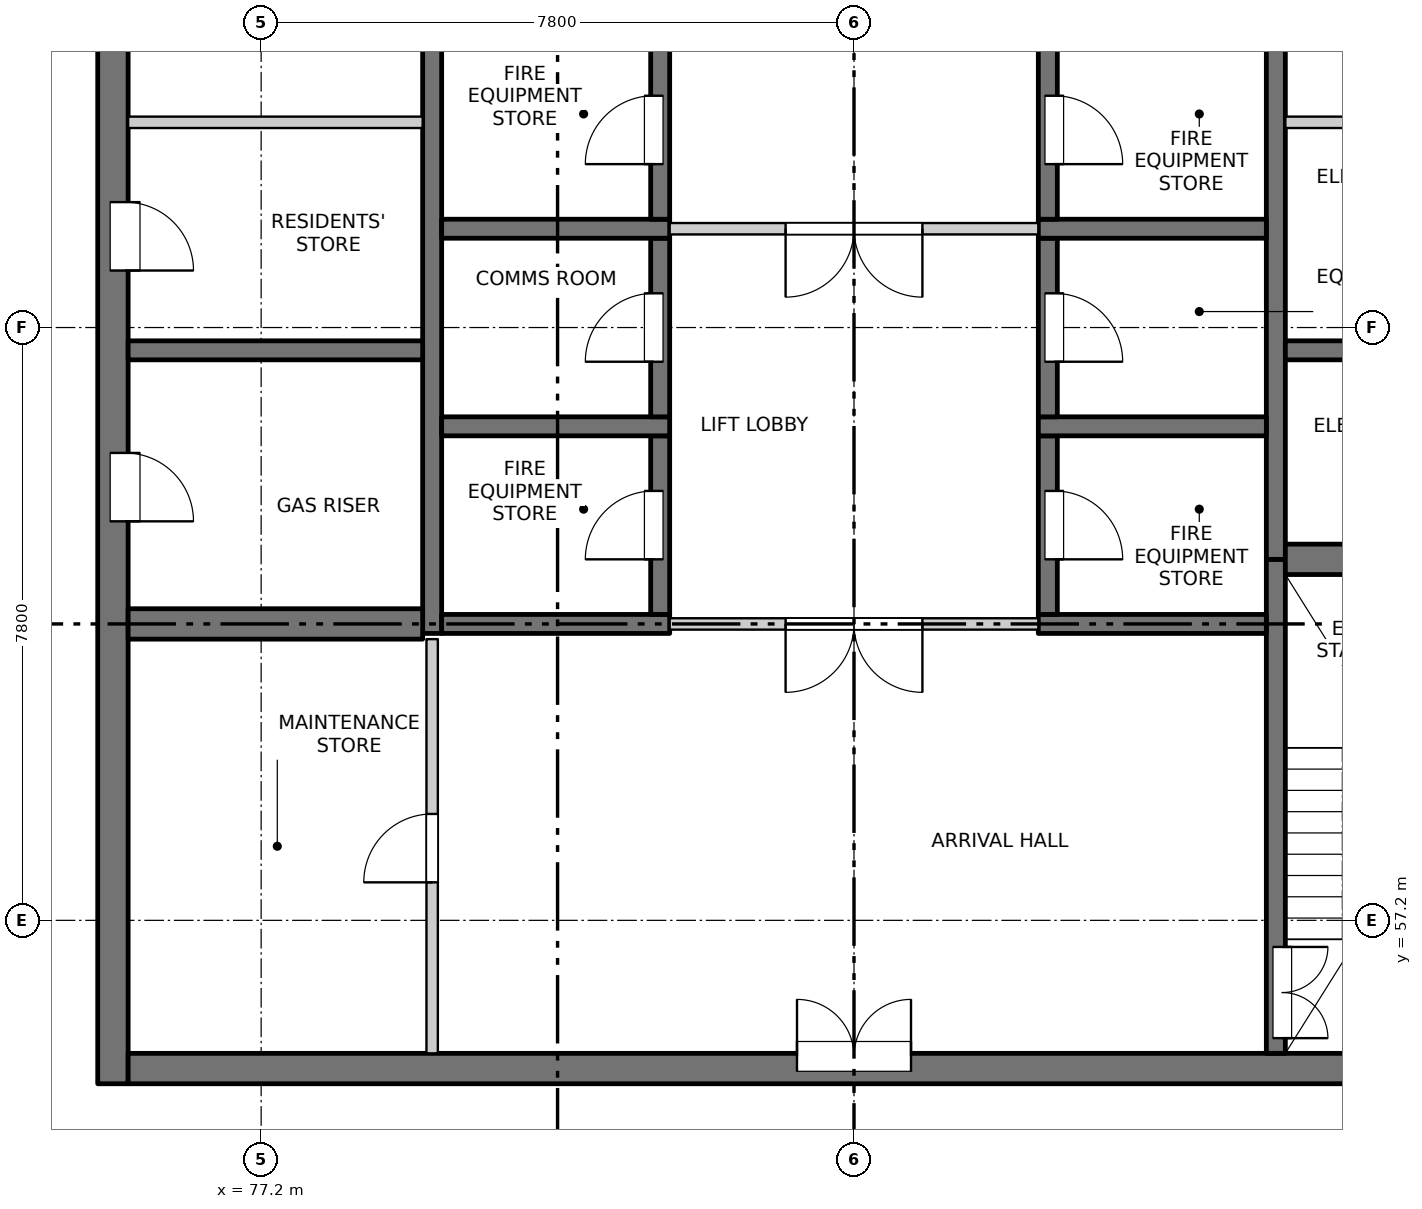
"""IFC4 building model, lengths in metres.
Left out: names, types, materials, properties, quantities, classifications, styles, units other than length and angle.
Written with IfcOpenShell. Run it as: python <this file> out.ifc"""

import sys

from ifc_helpers import new_model, si_unit, direction, frame, frame_2d, origin, place, context, subcontext, project, spatial, rectangle, extrude, element, fill, save


model = new_model("IFC4")
c1 = context("Model", 3, precision=1e-05, world=origin(), true_north=direction((0.0, 1.0)))
c2 = subcontext(c1, "Body", "Model", "MODEL_VIEW")
j1 = project(units=[si_unit("LENGTHUNIT", "METRE"), si_unit("PLANEANGLEUNIT", "RADIAN")], contexts=[c1])
p1 = place(None, origin())
s1 = spatial("IfcSite", under=j1, at=p1, CompositionType="ELEMENT")
p2 = place(p1, origin())
s2 = spatial("IfcBuilding", under=s1, at=p2, CompositionType="ELEMENT")
p3 = place(p2, frame((0.0, 0.0, 252.8)))
s3 = spatial("IfcBuildingStorey", under=s2, at=p3, CompositionType="ELEMENT", Elevation=252.8)
p4 = place(p3, frame((75.25, 55.05, -0.25), z_axis=(0.0, 0.0, 1.0), x_axis=(0.0, 1.0, 0.0)))
e1 = element("IfcWall", 1, at=p4, inside=s3, PredefinedType="SOLIDWALL", context=c2, shape_type="SweptSolid", body=[
    extrude(rectangle(XDim=22.25, YDim=0.4, at=frame_2d((11.125, 0.0))), origin(), (0.0, 0.0, 1.0), 3.4),
])
p5 = place(p4, frame((7.4, 0.0, 0.25)))
e2 = element("IfcOpeningElement", 2, at=p5, cuts=e1, PredefinedType="OPENING", context=c2, shape_type="SweptSolid", body=[
    extrude(rectangle(XDim=0.9, YDim=2.1, at=frame_2d((0.45, 1.05))), frame((0.0, 0.21, 0.0), z_axis=(0.0, -1.0, 0.0), x_axis=(1.0, 0.0, 0.0)), (0.0, 0.0, 1.0), 0.42),
])
p6 = place(p4, frame((10.7, 0.0, 0.25)))
e3 = element("IfcOpeningElement", 3, at=p6, cuts=e1, PredefinedType="OPENING", context=c2, shape_type="SweptSolid", body=[
    extrude(rectangle(XDim=0.9, YDim=2.1, at=frame_2d((0.45, 1.05))), frame((0.0, 0.21, 0.0), z_axis=(0.0, -1.0, 0.0), x_axis=(1.0, 0.0, 0.0)), (0.0, 0.0, 1.0), 0.42),
])
p7 = place(p4, frame((15.2, 0.0, 0.25)))
e4 = element("IfcOpeningElement", 4, at=p7, cuts=e1, PredefinedType="OPENING", context=c2, shape_type="SweptSolid", body=[
    extrude(rectangle(XDim=0.9, YDim=2.1, at=frame_2d((0.45, 1.05))), frame((0.0, 0.21, 0.0), z_axis=(0.0, -1.0, 0.0), x_axis=(1.0, 0.0, 0.0)), (0.0, 0.0, 1.0), 0.42),
])
p8 = place(p4, frame((20.0, 0.0, 0.25)))
e5 = element("IfcOpeningElement", 5, at=p8, cuts=e1, PredefinedType="OPENING", context=c2, shape_type="SweptSolid", body=[
    extrude(rectangle(XDim=0.9, YDim=2.1, at=frame_2d((0.45, 1.05))), frame((0.0, 0.21, 0.0), z_axis=(0.0, -1.0, 0.0), x_axis=(1.0, 0.0, 0.0)), (0.0, 0.0, 1.0), 0.42),
])
p9 = place(p3, frame((75.45, 55.25, -0.25), z_axis=(0.0, 0.0, 1.0), x_axis=(1.0, 0.0, 0.0)))
e6 = element("IfcWall", 6, at=p9, inside=s3, PredefinedType="SOLIDWALL", context=c2, shape_type="SweptSolid", body=[
    extrude(rectangle(XDim=19.1, YDim=0.4, at=frame_2d((9.55, 0.0))), origin(), (0.0, 0.0, 1.0), 3.4),
])
p10 = place(p9, frame((8.8, 0.0, 0.25)))
e7 = element("IfcOpeningElement", 7, at=p10, cuts=e6, PredefinedType="OPENING", context=c2, shape_type="SweptSolid", body=[
    extrude(rectangle(XDim=1.5, YDim=2.1, at=frame_2d((0.75, 1.05))), frame((0.0, 0.21, 0.0), z_axis=(0.0, -1.0, 0.0), x_axis=(1.0, 0.0, 0.0)), (0.0, 0.0, 1.0), 0.42),
])
p11 = place(p3, frame((79.45, 60.975, -0.25), z_axis=(0.0, 0.0, 1.0), x_axis=(0.0, 1.0, 0.0)))
e8 = element("IfcWall", 8, at=p11, inside=s3, PredefinedType="SOLIDWALL", context=c2, shape_type="SweptSolid", body=[
    extrude(rectangle(XDim=16.325, YDim=0.25, at=frame_2d((8.163, 0.0))), origin(), (0.0, 0.0, 1.0), 3.4),
])
p12 = place(p3, frame((90.55, 55.45, -0.25), z_axis=(0.0, 0.0, 1.0), x_axis=(0.0, 1.0, 0.0)))
e9 = element("IfcWall", 9, at=p12, inside=s3, PredefinedType="SOLIDWALL", context=c2, shape_type="SweptSolid", body=[
    extrude(rectangle(XDim=6.5, YDim=0.25, at=frame_2d((3.25, 0.0))), origin(), (0.0, 0.0, 1.0), 3.4),
])
p13 = place(p12, frame((0.2, 0.0, 0.25)))
e10 = element("IfcOpeningElement", 10, at=p13, cuts=e9, PredefinedType="OPENING", context=c2, shape_type="SweptSolid", body=[
    extrude(rectangle(XDim=1.2, YDim=2.1, at=frame_2d((0.6, 1.05))), frame((0.0, 0.135, 0.0), z_axis=(0.0, -1.0, 0.0), x_axis=(1.0, 0.0, 0.0)), (0.0, 0.0, 1.0), 0.27),
])
p14 = place(p3, frame((90.55, 61.95, -0.25), z_axis=(0.0, 0.0, 1.0), x_axis=(0.0, 1.0, 0.0)))
e11 = element("IfcWall", 11, at=p14, inside=s3, PredefinedType="SOLIDWALL", context=c2, shape_type="SweptSolid", body=[
    extrude(rectangle(XDim=15.35, YDim=0.25, at=frame_2d((7.675, 0.0))), origin(), (0.0, 0.0, 1.0), 3.4),
])
p15 = place(p3, frame((79.575, 61.1, -0.25), z_axis=(0.0, 0.0, 1.0), x_axis=(1.0, 0.0, 0.0)))
e12 = element("IfcWall", 12, at=p15, inside=s3, PredefinedType="SOLIDWALL", context=c2, shape_type="SweptSolid", body=[
    extrude(rectangle(XDim=3.0, YDim=0.25, at=frame_2d((1.5, 0.0))), origin(), (0.0, 0.0, 1.0), 3.4),
])
p16 = place(p3, frame((82.45, 61.225, -0.25), z_axis=(0.0, 0.0, 1.0), x_axis=(0.0, 1.0, 0.0)))
e13 = element("IfcWall", 13, at=p16, inside=s3, PredefinedType="SOLIDWALL", context=c2, shape_type="SweptSolid", body=[
    extrude(rectangle(XDim=2.35, YDim=0.25, at=frame_2d((1.175, 0.0))), origin(), (0.0, 0.0, 1.0), 3.4),
])
p17 = place(p16, frame((0.725, 0.0, 0.25)))
e14 = element("IfcOpeningElement", 14, at=p17, cuts=e13, PredefinedType="OPENING", context=c2, shape_type="SweptSolid", body=[
    extrude(rectangle(XDim=0.9, YDim=2.1, at=frame_2d((0.45, 1.05))), frame((0.0, 0.135, 0.0), z_axis=(0.0, -1.0, 0.0), x_axis=(1.0, 0.0, 0.0)), (0.0, 0.0, 1.0), 0.27),
])
p18 = place(p3, frame((79.575, 63.7, -0.25), z_axis=(0.0, 0.0, 1.0), x_axis=(1.0, 0.0, 0.0)))
e15 = element("IfcWall", 15, at=p18, inside=s3, PredefinedType="SOLIDWALL", context=c2, shape_type="SweptSolid", body=[
    extrude(rectangle(XDim=3.0, YDim=0.25, at=frame_2d((1.5, 0.0))), origin(), (0.0, 0.0, 1.0), 3.4),
])
p19 = place(p3, frame((82.45, 63.825, -0.25), z_axis=(0.0, 0.0, 1.0), x_axis=(0.0, 1.0, 0.0)))
e16 = element("IfcWall", 16, at=p19, inside=s3, PredefinedType="SOLIDWALL", context=c2, shape_type="SweptSolid", body=[
    extrude(rectangle(XDim=2.35, YDim=0.25, at=frame_2d((1.175, 0.0))), origin(), (0.0, 0.0, 1.0), 3.4),
])
p20 = place(p19, frame((0.725, 0.0, 0.25)))
e17 = element("IfcOpeningElement", 17, at=p20, cuts=e16, PredefinedType="OPENING", context=c2, shape_type="SweptSolid", body=[
    extrude(rectangle(XDim=0.9, YDim=2.1, at=frame_2d((0.45, 1.05))), frame((0.0, 0.135, 0.0), z_axis=(0.0, -1.0, 0.0), x_axis=(1.0, 0.0, 0.0)), (0.0, 0.0, 1.0), 0.27),
])
p21 = place(p3, frame((79.575, 66.3, -0.25), z_axis=(0.0, 0.0, 1.0), x_axis=(1.0, 0.0, 0.0)))
e18 = element("IfcWall", 18, at=p21, inside=s3, PredefinedType="SOLIDWALL", context=c2, shape_type="SweptSolid", body=[
    extrude(rectangle(XDim=3.0, YDim=0.25, at=frame_2d((1.5, 0.0))), origin(), (0.0, 0.0, 1.0), 3.4),
])
p22 = place(p3, frame((82.45, 66.425, -0.25), z_axis=(0.0, 0.0, 1.0), x_axis=(0.0, 1.0, 0.0)))
e19 = element("IfcWall", 19, at=p22, inside=s3, PredefinedType="SOLIDWALL", context=c2, shape_type="SweptSolid", body=[
    extrude(rectangle(XDim=2.35, YDim=0.25, at=frame_2d((1.175, 0.0))), origin(), (0.0, 0.0, 1.0), 3.4),
])
p23 = place(p22, frame((0.725, 0.0, 0.25)))
e20 = element("IfcOpeningElement", 20, at=p23, cuts=e19, PredefinedType="OPENING", context=c2, shape_type="SweptSolid", body=[
    extrude(rectangle(XDim=0.9, YDim=2.1, at=frame_2d((0.45, 1.05))), frame((0.0, 0.135, 0.0), z_axis=(0.0, -1.0, 0.0), x_axis=(1.0, 0.0, 0.0)), (0.0, 0.0, 1.0), 0.27),
])
p24 = place(p3, frame((87.425, 61.1, -0.25), z_axis=(0.0, 0.0, 1.0), x_axis=(1.0, 0.0, 0.0)))
e21 = element("IfcWall", 21, at=p24, inside=s3, PredefinedType="SOLIDWALL", context=c2, shape_type="SweptSolid", body=[
    extrude(rectangle(XDim=3.0, YDim=0.25, at=frame_2d((1.5, 0.0))), origin(), (0.0, 0.0, 1.0), 3.4),
])
p25 = place(p3, frame((87.55, 61.225, -0.25), z_axis=(0.0, 0.0, 1.0), x_axis=(0.0, 1.0, 0.0)))
e22 = element("IfcWall", 22, at=p25, inside=s3, PredefinedType="SOLIDWALL", context=c2, shape_type="SweptSolid", body=[
    extrude(rectangle(XDim=2.35, YDim=0.25, at=frame_2d((1.175, 0.0))), origin(), (0.0, 0.0, 1.0), 3.4),
])
p26 = place(p25, frame((0.725, 0.0, 0.25)))
e23 = element("IfcOpeningElement", 23, at=p26, cuts=e22, PredefinedType="OPENING", context=c2, shape_type="SweptSolid", body=[
    extrude(rectangle(XDim=0.9, YDim=2.1, at=frame_2d((0.45, 1.05))), frame((0.0, 0.135, 0.0), z_axis=(0.0, -1.0, 0.0), x_axis=(1.0, 0.0, 0.0)), (0.0, 0.0, 1.0), 0.27),
])
p27 = place(p3, frame((87.425, 63.7, -0.25), z_axis=(0.0, 0.0, 1.0), x_axis=(1.0, 0.0, 0.0)))
e24 = element("IfcWall", 24, at=p27, inside=s3, PredefinedType="SOLIDWALL", context=c2, shape_type="SweptSolid", body=[
    extrude(rectangle(XDim=3.0, YDim=0.25, at=frame_2d((1.5, 0.0))), origin(), (0.0, 0.0, 1.0), 3.4),
])
p28 = place(p3, frame((87.55, 63.825, -0.25), z_axis=(0.0, 0.0, 1.0), x_axis=(0.0, 1.0, 0.0)))
e25 = element("IfcWall", 25, at=p28, inside=s3, PredefinedType="SOLIDWALL", context=c2, shape_type="SweptSolid", body=[
    extrude(rectangle(XDim=2.35, YDim=0.25, at=frame_2d((1.175, 0.0))), origin(), (0.0, 0.0, 1.0), 3.4),
])
p29 = place(p28, frame((0.725, 0.0, 0.25)))
e26 = element("IfcOpeningElement", 26, at=p29, cuts=e25, PredefinedType="OPENING", context=c2, shape_type="SweptSolid", body=[
    extrude(rectangle(XDim=0.9, YDim=2.1, at=frame_2d((0.45, 1.05))), frame((0.0, 0.135, 0.0), z_axis=(0.0, -1.0, 0.0), x_axis=(1.0, 0.0, 0.0)), (0.0, 0.0, 1.0), 0.27),
])
p30 = place(p3, frame((87.425, 66.3, -0.25), z_axis=(0.0, 0.0, 1.0), x_axis=(1.0, 0.0, 0.0)))
e27 = element("IfcWall", 27, at=p30, inside=s3, PredefinedType="SOLIDWALL", context=c2, shape_type="SweptSolid", body=[
    extrude(rectangle(XDim=3.0, YDim=0.25, at=frame_2d((1.5, 0.0))), origin(), (0.0, 0.0, 1.0), 3.4),
])
p31 = place(p3, frame((87.55, 66.425, -0.25), z_axis=(0.0, 0.0, 1.0), x_axis=(0.0, 1.0, 0.0)))
e28 = element("IfcWall", 28, at=p31, inside=s3, PredefinedType="SOLIDWALL", context=c2, shape_type="SweptSolid", body=[
    extrude(rectangle(XDim=2.35, YDim=0.25, at=frame_2d((1.175, 0.0))), origin(), (0.0, 0.0, 1.0), 3.4),
])
p32 = place(p31, frame((0.725, 0.0, 0.25)))
e29 = element("IfcOpeningElement", 29, at=p32, cuts=e28, PredefinedType="OPENING", context=c2, shape_type="SweptSolid", body=[
    extrude(rectangle(XDim=0.9, YDim=2.1, at=frame_2d((0.45, 1.05))), frame((0.0, 0.135, 0.0), z_axis=(0.0, -1.0, 0.0), x_axis=(1.0, 0.0, 0.0)), (0.0, 0.0, 1.0), 0.27),
])
p33 = place(p3, frame((75.45, 61.1, -0.25), z_axis=(0.0, 0.0, 1.0), x_axis=(1.0, 0.0, 0.0)))
e30 = element("IfcWall", 30, at=p33, inside=s3, PredefinedType="SOLIDWALL", context=c2, shape_type="SweptSolid", body=[
    extrude(rectangle(XDim=3.875, YDim=0.4, at=frame_2d((1.938, 0.0))), origin(), (0.0, 0.0, 1.0), 3.4),
])
p34 = place(p3, frame((75.45, 64.7, -0.25), z_axis=(0.0, 0.0, 1.0), x_axis=(1.0, 0.0, 0.0)))
e31 = element("IfcWall", 31, at=p34, inside=s3, PredefinedType="SOLIDWALL", context=c2, shape_type="SweptSolid", body=[
    extrude(rectangle(XDim=3.875, YDim=0.25, at=frame_2d((1.938, 0.0))), origin(), (0.0, 0.0, 1.0), 3.4),
])
p35 = place(p3, frame((90.675, 61.95, -0.25), z_axis=(0.0, 0.0, 1.0), x_axis=(1.0, 0.0, 0.0)))
e32 = element("IfcWall", 32, at=p35, inside=s3, PredefinedType="SOLIDWALL", context=c2, shape_type="SweptSolid", body=[
    extrude(rectangle(XDim=3.875, YDim=0.4, at=frame_2d((1.938, 0.0))), origin(), (0.0, 0.0, 1.0), 3.4),
])
p36 = place(p3, frame((90.675, 64.7, -0.25), z_axis=(0.0, 0.0, 1.0), x_axis=(1.0, 0.0, 0.0)))
e33 = element("IfcWall", 33, at=p36, inside=s3, PredefinedType="SOLIDWALL", context=c2, shape_type="SweptSolid", body=[
    extrude(rectangle(XDim=3.875, YDim=0.25, at=frame_2d((1.938, 0.0))), origin(), (0.0, 0.0, 1.0), 3.4),
])
p37 = place(p3, frame((82.575, 61.1, 0.0), z_axis=(0.0, 0.0, 1.0), x_axis=(1.0, 0.0, 0.0)))
e34 = element("IfcWall", 34, at=p37, inside=s3, PredefinedType="PARTITIONING", context=c2, shape_type="SweptSolid", body=[
    extrude(rectangle(XDim=4.85, YDim=0.15, at=frame_2d((2.425, 0.0))), origin(), (0.0, 0.0, 1.0), 3.15),
])
p38 = place(p37, frame((1.525, 0.0, 0.0)))
e35 = element("IfcOpeningElement", 35, at=p38, cuts=e34, PredefinedType="OPENING", context=c2, shape_type="SweptSolid", body=[
    extrude(rectangle(XDim=1.8, YDim=2.1, at=frame_2d((0.9, 1.05))), frame((0.0, 0.085, 0.0), z_axis=(0.0, -1.0, 0.0), x_axis=(1.0, 0.0, 0.0)), (0.0, 0.0, 1.0), 0.17),
])
p39 = place(p3, frame((82.575, 66.3, 0.0), z_axis=(0.0, 0.0, 1.0), x_axis=(1.0, 0.0, 0.0)))
e36 = element("IfcWall", 36, at=p39, inside=s3, PredefinedType="PARTITIONING", context=c2, shape_type="SweptSolid", body=[
    extrude(rectangle(XDim=4.85, YDim=0.15, at=frame_2d((2.425, 0.0))), origin(), (0.0, 0.0, 1.0), 3.15),
])
p40 = place(p39, frame((1.525, 0.0, 0.0)))
e37 = element("IfcOpeningElement", 37, at=p40, cuts=e36, PredefinedType="OPENING", context=c2, shape_type="SweptSolid", body=[
    extrude(rectangle(XDim=1.8, YDim=2.1, at=frame_2d((0.9, 1.05))), frame((0.0, 0.085, 0.0), z_axis=(0.0, -1.0, 0.0), x_axis=(1.0, 0.0, 0.0)), (0.0, 0.0, 1.0), 0.17),
])
for number, where, z_axis, x_axis in (
    (38, (75.45, 67.7, 0.0), (0.0, 0.0, 1.0), (1.0, 0.0, 0.0)),
    (39, (90.675, 67.7, 0.0), (0.0, 0.0, 1.0), (1.0, 0.0, 0.0)),
):
    element("IfcWall", number, at=place(p3, frame(where, z_axis=z_axis, x_axis=x_axis)), inside=s3, PredefinedType="PARTITIONING", context=c2, shape_type="SweptSolid", body=[
        extrude(rectangle(XDim=3.875, YDim=0.15, at=frame_2d((1.938, 0.0))), origin(), (0.0, 0.0, 1.0), 3.15),
    ])
p41 = place(p3, frame((79.45, 55.45, 0.0), z_axis=(0.0, 0.0, 1.0), x_axis=(0.0, 1.0, 0.0)))
e40 = element("IfcWall", 40, at=p41, inside=s3, PredefinedType="PARTITIONING", context=c2, shape_type="SweptSolid", body=[
    extrude(rectangle(XDim=5.45, YDim=0.15, at=frame_2d((2.725, 0.0))), origin(), (0.0, 0.0, 1.0), 3.15),
])
p42 = place(p41, frame((2.25, 0.0, 0.0)))
e41 = element("IfcOpeningElement", 41, at=p42, cuts=e40, PredefinedType="OPENING", context=c2, shape_type="SweptSolid", body=[
    extrude(rectangle(XDim=0.9, YDim=2.1, at=frame_2d((0.45, 1.05))), frame((0.0, 0.085, 0.0), z_axis=(0.0, -1.0, 0.0), x_axis=(1.0, 0.0, 0.0)), (0.0, 0.0, 1.0), 0.17),
])
p43 = place(p10, origin())
e42 = element("IfcDoor", 42, at=p43, inside=s3, OperationType="DOUBLE_DOOR_SINGLE_SWING", PredefinedType="DOOR", context=c2, shape_type="SweptSolid", body=[
    extrude(rectangle(XDim=1.5, YDim=2.1, at=frame_2d((0.75, 1.05))), frame((0.0, 0.185, 0.0), z_axis=(0.0, -1.0, 0.0), x_axis=(1.0, 0.0, 0.0)), (0.0, 0.0, 1.0), 0.05),
])
fill(e7, e42)
p44 = place(p13, origin())
e43 = element("IfcDoor", 43, at=p44, inside=s3, OperationType="DOUBLE_DOOR_SINGLE_SWING", PredefinedType="DOOR", context=c2, shape_type="SweptSolid", body=[
    extrude(rectangle(XDim=1.2, YDim=2.1, at=frame_2d((0.6, 1.05))), frame((0.0, -0.06, 0.0), z_axis=(0.0, -1.0, 0.0), x_axis=(1.0, 0.0, 0.0)), (0.0, 0.0, 1.0), 0.05),
])
fill(e10, e43)
p45 = place(p42, origin())
e44 = element("IfcDoor", 44, at=p45, inside=s3, OperationType="SINGLE_SWING_LEFT", PredefinedType="DOOR", context=c2, shape_type="SweptSolid", body=[
    extrude(rectangle(XDim=0.9, YDim=2.1, at=frame_2d((0.45, 1.05))), frame((0.0, 0.025, 0.0), z_axis=(0.0, -1.0, 0.0), x_axis=(1.0, 0.0, 0.0)), (0.0, 0.0, 1.0), 0.05),
])
fill(e41, e44)
p46 = place(p38, origin())
e45 = element("IfcDoor", 45, at=p46, inside=s3, OperationType="DOUBLE_DOOR_SINGLE_SWING", PredefinedType="DOOR", context=c2, shape_type="SweptSolid", body=[
    extrude(rectangle(XDim=1.8, YDim=2.1, at=frame_2d((0.9, 1.05))), frame((0.0, 0.025, 0.0), z_axis=(0.0, -1.0, 0.0), x_axis=(1.0, 0.0, 0.0)), (0.0, 0.0, 1.0), 0.05),
])
fill(e35, e45)
p47 = place(p17, origin())
e46 = element("IfcDoor", 46, at=p47, inside=s3, OperationType="SINGLE_SWING_LEFT", PredefinedType="DOOR", context=c2, shape_type="SweptSolid", body=[
    extrude(rectangle(XDim=0.9, YDim=2.1, at=frame_2d((0.45, 1.05))), frame((0.0, 0.11, 0.0), z_axis=(0.0, -1.0, 0.0), x_axis=(1.0, 0.0, 0.0)), (0.0, 0.0, 1.0), 0.05),
])
fill(e14, e46)
p48 = place(p26, origin())
e47 = element("IfcDoor", 47, at=p48, inside=s3, OperationType="SINGLE_SWING_RIGHT", PredefinedType="DOOR", context=c2, shape_type="SweptSolid", body=[
    extrude(rectangle(XDim=0.9, YDim=2.1, at=frame_2d((0.45, 1.05))), frame((0.0, -0.06, 0.0), z_axis=(0.0, -1.0, 0.0), x_axis=(1.0, 0.0, 0.0)), (0.0, 0.0, 1.0), 0.05),
])
fill(e23, e47)
p49 = place(p5, origin())
e48 = element("IfcDoor", 48, at=p49, inside=s3, OperationType="SINGLE_SWING_RIGHT", PredefinedType="DOOR", context=c2, shape_type="SweptSolid", body=[
    extrude(rectangle(XDim=0.9, YDim=2.1, at=frame_2d((0.45, 1.05))), frame((0.0, -0.135, 0.0), z_axis=(0.0, -1.0, 0.0), x_axis=(1.0, 0.0, 0.0)), (0.0, 0.0, 1.0), 0.05),
])
fill(e2, e48)
p50 = place(p20, origin())
e49 = element("IfcDoor", 49, at=p50, inside=s3, OperationType="SINGLE_SWING_LEFT", PredefinedType="DOOR", context=c2, shape_type="SweptSolid", body=[
    extrude(rectangle(XDim=0.9, YDim=2.1, at=frame_2d((0.45, 1.05))), frame((0.0, 0.11, 0.0), z_axis=(0.0, -1.0, 0.0), x_axis=(1.0, 0.0, 0.0)), (0.0, 0.0, 1.0), 0.05),
])
fill(e17, e49)
p51 = place(p29, origin())
e50 = element("IfcDoor", 50, at=p51, inside=s3, OperationType="SINGLE_SWING_RIGHT", PredefinedType="DOOR", context=c2, shape_type="SweptSolid", body=[
    extrude(rectangle(XDim=0.9, YDim=2.1, at=frame_2d((0.45, 1.05))), frame((0.0, -0.06, 0.0), z_axis=(0.0, -1.0, 0.0), x_axis=(1.0, 0.0, 0.0)), (0.0, 0.0, 1.0), 0.05),
])
fill(e26, e50)
p52 = place(p6, origin())
e51 = element("IfcDoor", 51, at=p52, inside=s3, OperationType="SINGLE_SWING_RIGHT", PredefinedType="DOOR", context=c2, shape_type="SweptSolid", body=[
    extrude(rectangle(XDim=0.9, YDim=2.1, at=frame_2d((0.45, 1.05))), frame((0.0, -0.135, 0.0), z_axis=(0.0, -1.0, 0.0), x_axis=(1.0, 0.0, 0.0)), (0.0, 0.0, 1.0), 0.05),
])
fill(e3, e51)
p53 = place(p40, origin())
e52 = element("IfcDoor", 52, at=p53, inside=s3, OperationType="DOUBLE_DOOR_SINGLE_SWING", PredefinedType="DOOR", context=c2, shape_type="SweptSolid", body=[
    extrude(rectangle(XDim=1.8, YDim=2.1, at=frame_2d((0.9, 1.05))), frame((0.0, 0.025, 0.0), z_axis=(0.0, -1.0, 0.0), x_axis=(1.0, 0.0, 0.0)), (0.0, 0.0, 1.0), 0.05),
])
fill(e37, e52)
p54 = place(p23, origin())
e53 = element("IfcDoor", 53, at=p54, inside=s3, OperationType="SINGLE_SWING_LEFT", PredefinedType="DOOR", context=c2, shape_type="SweptSolid", body=[
    extrude(rectangle(XDim=0.9, YDim=2.1, at=frame_2d((0.45, 1.05))), frame((0.0, 0.11, 0.0), z_axis=(0.0, -1.0, 0.0), x_axis=(1.0, 0.0, 0.0)), (0.0, 0.0, 1.0), 0.05),
])
fill(e20, e53)
p55 = place(p32, origin())
e54 = element("IfcDoor", 54, at=p55, inside=s3, OperationType="SINGLE_SWING_RIGHT", PredefinedType="DOOR", context=c2, shape_type="SweptSolid", body=[
    extrude(rectangle(XDim=0.9, YDim=2.1, at=frame_2d((0.45, 1.05))), frame((0.0, -0.06, 0.0), z_axis=(0.0, -1.0, 0.0), x_axis=(1.0, 0.0, 0.0)), (0.0, 0.0, 1.0), 0.05),
])
fill(e29, e54)
save(model, sys.argv[1])
